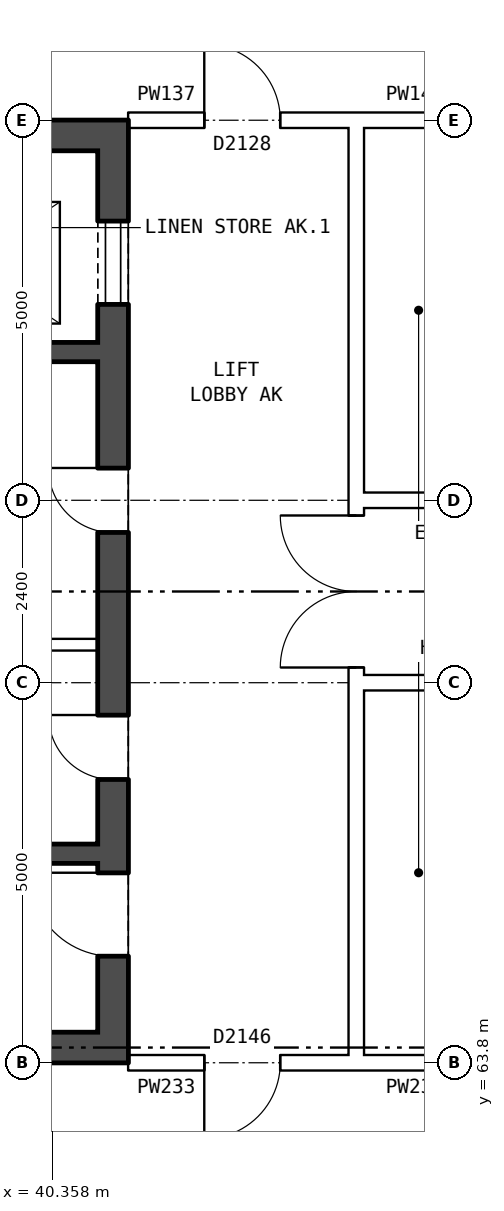
"""IFC4 building model, lengths in metres.
Left out: names, types, materials, properties, quantities, classifications, styles, units other than length and angle.
Written with IfcOpenShell. Run it as: python <this file> out.ifc"""

import sys

from ifc_helpers import new_model, si_unit, direction, frame, frame_2d, origin, place, context, subcontext, project, spatial, rectangle, extrude, element, fill, save


model = new_model("IFC4")
c1 = context("Model", 3, precision=1e-05, world=origin(), true_north=direction((0.0, 1.0)))
c2 = subcontext(c1, "Body", "Model", "MODEL_VIEW")
j1 = project(units=[si_unit("LENGTHUNIT", "METRE"), si_unit("PLANEANGLEUNIT", "RADIAN")], contexts=[c1])
p1 = place(None, origin())
s1 = spatial("IfcSite", under=j1, at=p1, CompositionType="ELEMENT")
p2 = place(p1, origin())
s2 = spatial("IfcBuilding", under=s1, at=p2, CompositionType="ELEMENT")
p3 = place(p2, frame((0.0, 0.0, 212.1)))
s3 = spatial("IfcBuildingStorey", under=s2, at=p3, CompositionType="ELEMENT", Elevation=212.1)
p4 = place(p3, frame((41.16, 76.2, 0.0), z_axis=(0.0, 0.0, 1.0), x_axis=(0.0, -1.0, 0.0)))
e1 = element("IfcWall", 1, at=p4, inside=s3, PredefinedType="SHEAR", context=c2, shape_type="SweptSolid", body=[
    extrude(rectangle(XDim=12.4, YDim=0.4, at=frame_2d((6.2, 0.0))), origin(), (0.0, 0.0, 1.0), 2.85),
])
p5 = place(p4, frame((1.325, 0.0, 0.0)))
e2 = element("IfcOpeningElement", 2, at=p5, cuts=e1, PredefinedType="OPENING", context=c2, shape_type="SweptSolid", body=[
    extrude(rectangle(XDim=1.1, YDim=2.1, at=frame_2d((0.55, 1.05))), frame((0.0, 0.21, 0.0), z_axis=(0.0, -1.0, 0.0), x_axis=(1.0, 0.0, 0.0)), (0.0, 0.0, 1.0), 0.42),
])
p6 = place(p4, frame((4.575, 0.0, 0.0)))
e3 = element("IfcOpeningElement", 3, at=p6, cuts=e1, PredefinedType="OPENING", context=c2, shape_type="SweptSolid", body=[
    extrude(rectangle(XDim=0.85, YDim=2.1, at=frame_2d((0.425, 1.05))), frame((0.0, 0.21, 0.0), z_axis=(0.0, -1.0, 0.0), x_axis=(1.0, 0.0, 0.0)), (0.0, 0.0, 1.0), 0.42),
])
p7 = place(p4, frame((7.825, 0.0, 0.0)))
e4 = element("IfcOpeningElement", 4, at=p7, cuts=e1, PredefinedType="OPENING", context=c2, shape_type="SweptSolid", body=[
    extrude(rectangle(XDim=0.85, YDim=2.1, at=frame_2d((0.425, 1.05))), frame((0.0, 0.21, 0.0), z_axis=(0.0, -1.0, 0.0), x_axis=(1.0, 0.0, 0.0)), (0.0, 0.0, 1.0), 0.42),
])
p8 = place(p4, frame((9.9, 0.0, 0.0)))
e5 = element("IfcOpeningElement", 5, at=p8, cuts=e1, PredefinedType="OPENING", context=c2, shape_type="SweptSolid", body=[
    extrude(rectangle(XDim=1.1, YDim=2.1, at=frame_2d((0.55, 1.05))), frame((0.0, 0.21, 0.0), z_axis=(0.0, -1.0, 0.0), x_axis=(1.0, 0.0, 0.0)), (0.0, 0.0, 1.0), 0.42),
])
for number, where, z_axis, x_axis in (
    (6, (40.96, 76.0, 0.0), (0.0, 0.0, 1.0), (-1.0, 0.0, 0.0)),
    (7, (40.96, 64.0, 0.0), (0.0, 0.0, 1.0), (-1.0, 0.0, 0.0)),
):
    element("IfcWall", number, at=place(p3, frame(where, z_axis=z_axis, x_axis=x_axis)), inside=s3, PredefinedType="SHEAR", context=c2, shape_type="SweptSolid", body=[
        extrude(rectangle(XDim=8.2, YDim=0.4, at=frame_2d((4.1, 0.0))), origin(), (0.0, 0.0, 1.0), 2.85),
    ])
p9 = place(p3, frame((40.96, 73.15, 0.0), z_axis=(0.0, 0.0, 1.0), x_axis=(-1.0, 0.0, 0.0)))
e8 = element("IfcWall", 8, at=p9, inside=s3, PredefinedType="SHEAR", context=c2, shape_type="SweptSolid", body=[
    extrude(rectangle(XDim=3.595, YDim=0.25, at=frame_2d((1.797, 0.0))), origin(), (0.0, 0.0, 1.0), 2.85),
])
p10 = place(p3, frame((40.96, 69.3, 0.0), z_axis=(0.0, 0.0, 1.0), x_axis=(-1.0, 0.0, 0.0)))
e9 = element("IfcWall", 9, at=p10, inside=s3, PredefinedType="PARTITIONING", context=c2, shape_type="SweptSolid", body=[
    extrude(rectangle(XDim=2.525, YDim=0.15, at=frame_2d((1.262, 0.0))), origin(), (0.0, 0.0, 1.0), 2.85),
])
p11 = place(p3, frame((40.96, 66.55, 0.0), z_axis=(0.0, 0.0, 1.0), x_axis=(-1.0, 0.0, 0.0)))
e10 = element("IfcWall", 10, at=p11, inside=s3, PredefinedType="SHEAR", context=c2, shape_type="SweptSolid", body=[
    extrude(rectangle(XDim=2.525, YDim=0.25, at=frame_2d((1.262, 0.0))), origin(), (0.0, 0.0, 1.0), 2.85),
])
p12 = place(p3, frame((44.36, 63.9, 0.0), z_axis=(0.0, 0.0, 1.0), x_axis=(0.0, 1.0, 0.0)))
e11 = element("IfcWall", 11, at=p12, inside=s3, PredefinedType="PARTITIONING", context=c2, shape_type="SweptSolid", body=[
    extrude(rectangle(XDim=12.2, YDim=0.2, at=frame_2d((6.1, 0.0))), origin(), (0.0, 0.0, 1.0), 2.85),
])
p13 = place(p12, frame((5.1, 0.0, 0.0)))
e12 = element("IfcOpeningElement", 12, at=p13, cuts=e11, PredefinedType="OPENING", context=c2, shape_type="SweptSolid", body=[
    extrude(rectangle(XDim=2.0, YDim=2.1, at=frame_2d((1.0, 1.05))), frame((0.0, 0.11, 0.0), z_axis=(0.0, -1.0, 0.0), x_axis=(1.0, 0.0, 0.0)), (0.0, 0.0, 1.0), 0.22),
])
p14 = place(p3, frame((41.36, 63.8, 0.0), z_axis=(0.0, 0.0, 1.0), x_axis=(1.0, 0.0, 0.0)))
e13 = element("IfcWall", 13, at=p14, inside=s3, PredefinedType="PARTITIONING", context=c2, shape_type="SweptSolid", body=[
    extrude(rectangle(XDim=3.0, YDim=0.2, at=frame_2d((1.5, 0.0))), origin(), (0.0, 0.0, 1.0), 2.85),
])
p15 = place(p14, frame((1.0, 0.0, 0.0)))
e14 = element("IfcOpeningElement", 14, at=p15, cuts=e13, PredefinedType="OPENING", context=c2, shape_type="SweptSolid", body=[
    extrude(rectangle(XDim=1.0, YDim=2.1, at=frame_2d((0.5, 1.05))), frame((0.0, 0.11, 0.0), z_axis=(0.0, -1.0, 0.0), x_axis=(1.0, 0.0, 0.0)), (0.0, 0.0, 1.0), 0.22),
])
p16 = place(p3, frame((44.36, 63.8, 0.0), z_axis=(0.0, 0.0, 1.0), x_axis=(1.0, 0.0, 0.0)))
e15 = element("IfcWall", 15, at=p16, inside=s3, PredefinedType="PARTITIONING", context=c2, shape_type="SweptSolid", body=[
    extrude(rectangle(XDim=1.54, YDim=0.2, at=frame_2d((0.77, 0.0))), origin(), (0.0, 0.0, 1.0), 2.85),
])
p17 = place(p3, frame((44.36, 68.8, 0.0), z_axis=(0.0, 0.0, 1.0), x_axis=(1.0, 0.0, 0.0)))
e16 = element("IfcWall", 16, at=p17, inside=s3, PredefinedType="PARTITIONING", context=c2, shape_type="SweptSolid", body=[
    extrude(rectangle(XDim=19.28, YDim=0.2, at=frame_2d((9.64, 0.0))), origin(), (0.0, 0.0, 1.0), 2.85),
])
p18 = place(p17, frame((14.64, 0.0, 0.0)))
e17 = element("IfcOpeningElement", 17, at=p18, cuts=e16, PredefinedType="OPENING", context=c2, shape_type="SweptSolid", body=[
    extrude(rectangle(XDim=1.0, YDim=2.1, at=frame_2d((0.5, 1.05))), frame((0.0, 0.11, 0.0), z_axis=(0.0, -1.0, 0.0), x_axis=(1.0, 0.0, 0.0)), (0.0, 0.0, 1.0), 0.22),
])
p19 = place(p17, frame((5.64, 0.0, 0.0)))
e18 = element("IfcOpeningElement", 18, at=p19, cuts=e16, PredefinedType="OPENING", context=c2, shape_type="SweptSolid", body=[
    extrude(rectangle(XDim=1.0, YDim=2.1, at=frame_2d((0.5, 1.05))), frame((0.0, 0.11, 0.0), z_axis=(0.0, -1.0, 0.0), x_axis=(1.0, 0.0, 0.0)), (0.0, 0.0, 1.0), 0.22),
])
p20 = place(p3, frame((44.36, 71.2, 0.0), z_axis=(0.0, 0.0, 1.0), x_axis=(1.0, 0.0, 0.0)))
e19 = element("IfcWall", 19, at=p20, inside=s3, PredefinedType="PARTITIONING", context=c2, shape_type="SweptSolid", body=[
    extrude(rectangle(XDim=19.28, YDim=0.2, at=frame_2d((9.64, 0.0))), origin(), (0.0, 0.0, 1.0), 2.85),
])
p21 = place(p20, frame((14.64, 0.0, 0.0)))
e20 = element("IfcOpeningElement", 20, at=p21, cuts=e19, PredefinedType="OPENING", context=c2, shape_type="SweptSolid", body=[
    extrude(rectangle(XDim=1.0, YDim=2.1, at=frame_2d((0.5, 1.05))), frame((0.0, 0.11, 0.0), z_axis=(0.0, -1.0, 0.0), x_axis=(1.0, 0.0, 0.0)), (0.0, 0.0, 1.0), 0.22),
])
p22 = place(p20, frame((5.64, 0.0, 0.0)))
e21 = element("IfcOpeningElement", 21, at=p22, cuts=e19, PredefinedType="OPENING", context=c2, shape_type="SweptSolid", body=[
    extrude(rectangle(XDim=1.0, YDim=2.1, at=frame_2d((0.5, 1.05))), frame((0.0, 0.11, 0.0), z_axis=(0.0, -1.0, 0.0), x_axis=(1.0, 0.0, 0.0)), (0.0, 0.0, 1.0), 0.22),
])
p23 = place(p3, frame((41.36, 76.2, 0.0), z_axis=(0.0, 0.0, 1.0), x_axis=(1.0, 0.0, 0.0)))
e22 = element("IfcWall", 22, at=p23, inside=s3, PredefinedType="PARTITIONING", context=c2, shape_type="SweptSolid", body=[
    extrude(rectangle(XDim=3.0, YDim=0.2, at=frame_2d((1.5, 0.0))), origin(), (0.0, 0.0, 1.0), 2.85),
])
p24 = place(p23, frame((1.0, 0.0, 0.0)))
e23 = element("IfcOpeningElement", 23, at=p24, cuts=e22, PredefinedType="OPENING", context=c2, shape_type="SweptSolid", body=[
    extrude(rectangle(XDim=1.0, YDim=2.1, at=frame_2d((0.5, 1.05))), frame((0.0, 0.11, 0.0), z_axis=(0.0, -1.0, 0.0), x_axis=(1.0, 0.0, 0.0)), (0.0, 0.0, 1.0), 0.22),
])
p25 = place(p3, frame((44.36, 76.2, 0.0), z_axis=(0.0, 0.0, 1.0), x_axis=(1.0, 0.0, 0.0)))
e24 = element("IfcWall", 24, at=p25, inside=s3, PredefinedType="PARTITIONING", context=c2, shape_type="SweptSolid", body=[
    extrude(rectangle(XDim=1.54, YDim=0.2, at=frame_2d((0.77, 0.0))), origin(), (0.0, 0.0, 1.0), 2.85),
])
p26 = place(p5, origin())
e25 = element("IfcDoor", 25, at=p26, inside=s3, OperationType="DOUBLE_DOOR_SLIDING", PredefinedType="DOOR", context=c2, shape_type="SweptSolid", body=[
    extrude(rectangle(XDim=1.1, YDim=2.1, at=frame_2d((0.55, 1.05))), frame((0.0, -0.135, 0.0), z_axis=(0.0, -1.0, 0.0), x_axis=(1.0, 0.0, 0.0)), (0.0, 0.0, 1.0), 0.05),
])
fill(e2, e25)
p27 = place(p6, frame((0.85, 0.0, 0.0), z_axis=(0.0, 0.0, 1.0), x_axis=(-1.0, 0.0, 0.0)))
e26 = element("IfcDoor", 26, at=p27, inside=s3, OperationType="SINGLE_SWING_RIGHT", PredefinedType="DOOR", context=c2, shape_type="SweptSolid", body=[
    extrude(rectangle(XDim=0.85, YDim=2.1, at=frame_2d((0.425, 1.05))), frame((0.0, 0.185, 0.0), z_axis=(0.0, -1.0, 0.0), x_axis=(1.0, 0.0, 0.0)), (0.0, 0.0, 1.0), 0.05),
])
fill(e3, e26)
p28 = place(p7, frame((0.85, 0.0, 0.0), z_axis=(0.0, 0.0, 1.0), x_axis=(-1.0, 0.0, 0.0)))
e27 = element("IfcDoor", 27, at=p28, inside=s3, OperationType="SINGLE_SWING_RIGHT", PredefinedType="DOOR", context=c2, shape_type="SweptSolid", body=[
    extrude(rectangle(XDim=0.85, YDim=2.1, at=frame_2d((0.425, 1.05))), frame((0.0, 0.185, 0.0), z_axis=(0.0, -1.0, 0.0), x_axis=(1.0, 0.0, 0.0)), (0.0, 0.0, 1.0), 0.05),
])
fill(e4, e27)
p29 = place(p8, frame((1.1, 0.0, 0.0), z_axis=(0.0, 0.0, 1.0), x_axis=(-1.0, 0.0, 0.0)))
e28 = element("IfcDoor", 28, at=p29, inside=s3, OperationType="SINGLE_SWING_RIGHT", PredefinedType="DOOR", context=c2, shape_type="SweptSolid", body=[
    extrude(rectangle(XDim=1.1, YDim=2.1, at=frame_2d((0.55, 1.05))), frame((0.0, 0.185, 0.0), z_axis=(0.0, -1.0, 0.0), x_axis=(1.0, 0.0, 0.0)), (0.0, 0.0, 1.0), 0.05),
])
fill(e5, e28)
p30 = place(p13, origin())
e29 = element("IfcDoor", 29, at=p30, inside=s3, OperationType="DOUBLE_DOOR_SINGLE_SWING", PredefinedType="DOOR", context=c2, shape_type="SweptSolid", body=[
    extrude(rectangle(XDim=2.0, YDim=2.1, at=frame_2d((1.0, 1.05))), frame((0.0, 0.025, 0.0), z_axis=(0.0, -1.0, 0.0), x_axis=(1.0, 0.0, 0.0)), (0.0, 0.0, 1.0), 0.05),
])
fill(e12, e29)
p31 = place(p15, frame((1.0, 0.0, 0.0), z_axis=(0.0, 0.0, 1.0), x_axis=(-1.0, 0.0, 0.0)))
e30 = element("IfcDoor", 30, at=p31, inside=s3, OperationType="SINGLE_SWING_RIGHT", PredefinedType="DOOR", context=c2, shape_type="SweptSolid", body=[
    extrude(rectangle(XDim=1.0, YDim=2.1, at=frame_2d((0.5, 1.05))), frame((0.0, 0.025, 0.0), z_axis=(0.0, -1.0, 0.0), x_axis=(1.0, 0.0, 0.0)), (0.0, 0.0, 1.0), 0.05),
])
fill(e14, e30)
p32 = place(p24, origin())
e31 = element("IfcDoor", 31, at=p32, inside=s3, OperationType="SINGLE_SWING_LEFT", PredefinedType="DOOR", context=c2, shape_type="SweptSolid", body=[
    extrude(rectangle(XDim=1.0, YDim=2.1, at=frame_2d((0.5, 1.05))), frame((0.0, 0.025, 0.0), z_axis=(0.0, -1.0, 0.0), x_axis=(1.0, 0.0, 0.0)), (0.0, 0.0, 1.0), 0.05),
])
fill(e23, e31)
save(model, sys.argv[1])
